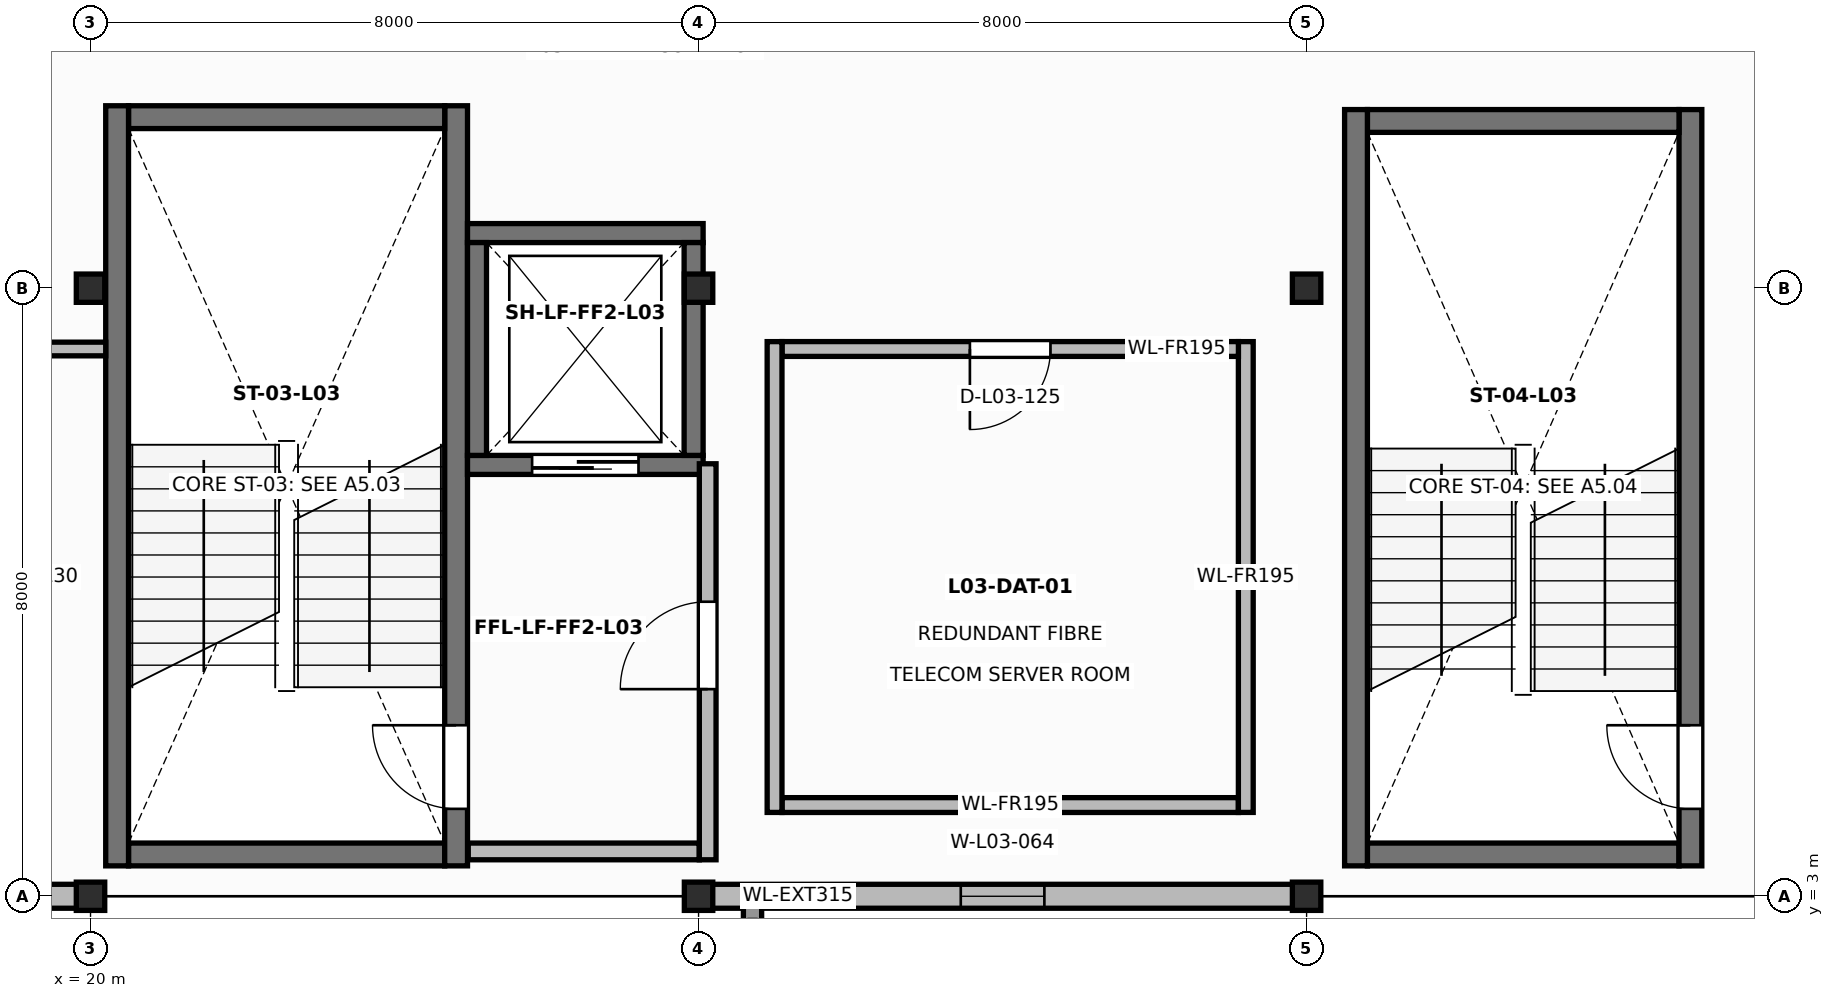
"""IFC4 building model, lengths in metres.
Left out: names, types, materials, properties, quantities, classifications, styles, units other than length and angle.
Written with IfcOpenShell. Run it as: python <this file> out.ifc"""

import sys

from ifc_helpers import new_model, si_unit, direction, frame, frame_2d, origin, origin_2d, place, context, subcontext, project, spatial, rectangle, i_section, extrude, element, fill, save


model = new_model("IFC4")
c1 = context("Model", 3, precision=1e-05, world=origin(), true_north=direction((0.0, 1.0)))
c2 = subcontext(c1, "Body", "Model", "MODEL_VIEW")
j1 = project(units=[si_unit("LENGTHUNIT", "METRE"), si_unit("PLANEANGLEUNIT", "RADIAN")], contexts=[c1])
p1 = place(None, origin())
s1 = spatial("IfcSite", under=j1, at=p1, CompositionType="ELEMENT")
p2 = place(p1, origin())
s2 = spatial("IfcBuilding", under=s1, at=p2, CompositionType="ELEMENT")
p3 = place(p2, frame((0.0, 0.0, 15.6)))
s3 = spatial("IfcBuildingStorey", under=s2, at=p3, CompositionType="ELEMENT", Elevation=15.6)
for number, where, z_axis, x_axis in (
    (1, (20.0, 3.0, 0.0), (0.0, 0.0, 1.0), (1.0, 0.0, 0.0)),
    (2, (20.0, 11.0, 0.0), (0.0, 0.0, 1.0), (1.0, 0.0, 0.0)),
    (3, (28.0, 3.0, 0.0), (0.0, 0.0, 1.0), (1.0, 0.0, 0.0)),
    (4, (28.0, 11.0, 0.0), (0.0, 0.0, 1.0), (1.0, 0.0, 0.0)),
    (5, (36.0, 3.0, 0.0), (0.0, 0.0, 1.0), (1.0, 0.0, 0.0)),
    (6, (36.0, 11.0, 0.0), (0.0, 0.0, 1.0), (1.0, 0.0, 0.0)),
):
    element("IfcColumn", number, at=place(p3, frame(where, z_axis=z_axis, x_axis=x_axis)), inside=s3, PredefinedType="COLUMN", context=c2, shape_type="SweptSolid", body=[
        extrude(i_section(OverallWidth=0.374, OverallDepth=0.372, WebThickness=0.016, FlangeThickness=0.026, at=origin_2d()), origin(), (0.0, 0.0, 1.0), 4.2),
    ])
p4 = place(p3, frame((20.5, 3.55, 0.0), z_axis=(0.0, 0.0, 1.0), x_axis=(1.0, 0.0, 0.0)))
e7 = element("IfcWall", 7, at=p4, inside=s3, PredefinedType="SHEAR", context=c2, shape_type="SweptSolid", body=[
    extrude(rectangle(XDim=4.16, YDim=0.3, at=frame_2d((2.08, 0.0))), origin(), (0.0, 0.0, 1.0), 3.975),
])
p5 = place(p3, frame((24.81, 3.4, 0.0), z_axis=(0.0, 0.0, 1.0), x_axis=(0.0, 1.0, 0.0)))
e8 = element("IfcWall", 8, at=p5, inside=s3, PredefinedType="SHEAR", context=c2, shape_type="SweptSolid", body=[
    extrude(rectangle(XDim=10.0, YDim=0.3, at=frame_2d((5.0, 0.0))), origin(), (0.0, 0.0, 1.0), 3.975),
])
p6 = place(p5, frame((0.75, 0.0, 0.0)))
e9 = element("IfcOpeningElement", 9, at=p6, cuts=e8, PredefinedType="OPENING", context=c2, shape_type="SweptSolid", body=[
    extrude(rectangle(XDim=1.1, YDim=2.15, at=frame_2d((0.55, 1.075))), frame((0.0, 0.16, 0.0), z_axis=(0.0, -1.0, 0.0), x_axis=(1.0, 0.0, 0.0)), (0.0, 0.0, 1.0), 0.32),
])
p7 = place(p3, frame((24.66, 13.25, 0.0), z_axis=(0.0, 0.0, 1.0), x_axis=(-1.0, 0.0, 0.0)))
e10 = element("IfcWall", 10, at=p7, inside=s3, PredefinedType="SHEAR", context=c2, shape_type="SweptSolid", body=[
    extrude(rectangle(XDim=4.16, YDim=0.3, at=frame_2d((2.08, 0.0))), origin(), (0.0, 0.0, 1.0), 3.975),
])
p8 = place(p3, frame((20.35, 13.4, 0.0), z_axis=(0.0, 0.0, 1.0), x_axis=(0.0, -1.0, 0.0)))
e11 = element("IfcWall", 11, at=p8, inside=s3, PredefinedType="SHEAR", context=c2, shape_type="SweptSolid", body=[
    extrude(rectangle(XDim=10.0, YDim=0.3, at=frame_2d((5.0, 0.0))), origin(), (0.0, 0.0, 1.0), 3.975),
])
p9 = place(p3, frame((36.8, 3.55, 0.0), z_axis=(0.0, 0.0, 1.0), x_axis=(1.0, 0.0, 0.0)))
e12 = element("IfcWall", 12, at=p9, inside=s3, PredefinedType="SHEAR", context=c2, shape_type="SweptSolid", body=[
    extrude(rectangle(XDim=4.1, YDim=0.3, at=frame_2d((2.05, 0.0))), origin(), (0.0, 0.0, 1.0), 3.975),
])
p10 = place(p3, frame((41.05, 3.4, 0.0), z_axis=(0.0, 0.0, 1.0), x_axis=(0.0, 1.0, 0.0)))
e13 = element("IfcWall", 13, at=p10, inside=s3, PredefinedType="SHEAR", context=c2, shape_type="SweptSolid", body=[
    extrude(rectangle(XDim=9.95, YDim=0.3, at=frame_2d((4.975, 0.0))), origin(), (0.0, 0.0, 1.0), 3.975),
])
p11 = place(p10, frame((0.75, 0.0, 0.0)))
e14 = element("IfcOpeningElement", 14, at=p11, cuts=e13, PredefinedType="OPENING", context=c2, shape_type="SweptSolid", body=[
    extrude(rectangle(XDim=1.1, YDim=2.15, at=frame_2d((0.55, 1.075))), frame((0.0, 0.16, 0.0), z_axis=(0.0, -1.0, 0.0), x_axis=(1.0, 0.0, 0.0)), (0.0, 0.0, 1.0), 0.32),
])
p12 = place(p3, frame((40.9, 13.2, 0.0), z_axis=(0.0, 0.0, 1.0), x_axis=(-1.0, 0.0, 0.0)))
e15 = element("IfcWall", 15, at=p12, inside=s3, PredefinedType="SHEAR", context=c2, shape_type="SweptSolid", body=[
    extrude(rectangle(XDim=4.1, YDim=0.3, at=frame_2d((2.05, 0.0))), origin(), (0.0, 0.0, 1.0), 3.975),
])
p13 = place(p3, frame((36.65, 13.35, 0.0), z_axis=(0.0, 0.0, 1.0), x_axis=(0.0, -1.0, 0.0)))
e16 = element("IfcWall", 16, at=p13, inside=s3, PredefinedType="SHEAR", context=c2, shape_type="SweptSolid", body=[
    extrude(rectangle(XDim=9.95, YDim=0.3, at=frame_2d((4.975, 0.0))), origin(), (0.0, 0.0, 1.0), 3.975),
])
p14 = place(p3, frame((24.96, 8.675, 0.0), z_axis=(0.0, 0.0, 1.0), x_axis=(1.0, 0.0, 0.0)))
e17 = element("IfcWall", 17, at=p14, inside=s3, PredefinedType="SOLIDWALL", context=c2, shape_type="SweptSolid", body=[
    extrude(rectangle(XDim=3.1, YDim=0.25, at=frame_2d((1.55, 0.0))), origin(), (0.0, 0.0, 1.0), 3.975),
])
p15 = place(p14, frame((0.85, 0.0, 0.0)))
e18 = element("IfcOpeningElement", 18, at=p15, cuts=e17, PredefinedType="OPENING", context=c2, shape_type="SweptSolid", body=[
    extrude(rectangle(XDim=1.4, YDim=2.25, at=frame_2d((0.7, 1.125))), frame((0.0, 0.135, 0.0), z_axis=(0.0, -1.0, 0.0), x_axis=(1.0, 0.0, 0.0)), (0.0, 0.0, 1.0), 0.27),
])
p16 = place(p3, frame((28.06, 11.725, 0.0), z_axis=(0.0, 0.0, 1.0), x_axis=(-1.0, 0.0, 0.0)))
e19 = element("IfcWall", 19, at=p16, inside=s3, PredefinedType="SOLIDWALL", context=c2, shape_type="SweptSolid", body=[
    extrude(rectangle(XDim=3.1, YDim=0.25, at=frame_2d((1.55, 0.0))), origin(), (0.0, 0.0, 1.0), 3.975),
])
for number, where, z_axis, x_axis in (
    (20, (27.935, 8.8, 0.0), (0.0, 0.0, 1.0), (0.0, 1.0, 0.0)),
    (21, (25.085, 11.6, 0.0), (0.0, 0.0, 1.0), (0.0, -1.0, 0.0)),
):
    element("IfcWall", number, at=place(p3, frame(where, z_axis=z_axis, x_axis=x_axis)), inside=s3, PredefinedType="SOLIDWALL", context=c2, shape_type="SweptSolid", body=[
        extrude(rectangle(XDim=2.8, YDim=0.25, at=frame_2d((1.4, 0.0))), origin(), (0.0, 0.0, 1.0), 3.975),
    ])
p17 = place(p3, frame((24.97, 3.59, 0.0), z_axis=(0.0, 0.0, 1.0), x_axis=(1.0, 0.0, 0.0)))
e22 = element("IfcWall", 22, at=p17, inside=s3, PredefinedType="SOLIDWALL", context=c2, shape_type="SweptSolid", body=[
    extrude(rectangle(XDim=3.04, YDim=0.22, at=frame_2d((1.52, 0.0))), origin(), (0.0, 0.0, 1.0), 3.975),
])
p18 = place(p3, frame((28.12, 3.48, 0.0), z_axis=(0.0, 0.0, 1.0), x_axis=(0.0, 1.0, 0.0)))
e23 = element("IfcWall", 23, at=p18, inside=s3, PredefinedType="SOLIDWALL", context=c2, shape_type="SweptSolid", body=[
    extrude(rectangle(XDim=5.21, YDim=0.22, at=frame_2d((2.605, 0.0))), origin(), (0.0, 0.0, 1.0), 3.358),
])
p19 = place(p18, frame((2.245, 0.0, 0.0)))
e24 = element("IfcOpeningElement", 24, at=p19, cuts=e23, PredefinedType="OPENING", context=c2, shape_type="SweptSolid", body=[
    extrude(rectangle(XDim=1.15, YDim=2.15, at=frame_2d((0.575, 1.075))), frame((0.0, 0.12, 0.0), z_axis=(0.0, -1.0, 0.0), x_axis=(1.0, 0.0, 0.0)), (0.0, 0.0, 1.0), 0.24),
])
p20 = place(p3, frame((12.01, 3.0, 0.0), z_axis=(0.0, 0.0, 1.0), x_axis=(1.0, 0.0, 0.0)))
e25 = element("IfcWall", 25, at=p20, inside=s3, PredefinedType="SOLIDWALL", context=c2, shape_type="SweptSolid", body=[
    extrude(rectangle(XDim=7.98, YDim=0.315, at=frame_2d((3.99, 0.0))), origin(), (0.0, 0.0, 1.0), 3.35),
])
p21 = place(p20, frame((3.315, 0.0, 0.85)))
e26 = element("IfcOpeningElement", 26, at=p21, cuts=e25, PredefinedType="OPENING", context=c2, shape_type="SweptSolid", body=[
    extrude(rectangle(XDim=1.35, YDim=1.95, at=frame_2d((0.675, 0.975))), frame((0.0, 0.167, 0.0), z_axis=(0.0, -1.0, 0.0), x_axis=(1.0, 0.0, 0.0)), (0.0, 0.0, 1.0), 0.335),
])
p22 = place(p3, frame((28.01, 3.0, 0.0), z_axis=(0.0, 0.0, 1.0), x_axis=(1.0, 0.0, 0.0)))
e27 = element("IfcWall", 27, at=p22, inside=s3, PredefinedType="SOLIDWALL", context=c2, shape_type="SweptSolid", body=[
    extrude(rectangle(XDim=7.98, YDim=0.315, at=frame_2d((3.99, 0.0))), origin(), (0.0, 0.0, 1.0), 3.35),
])
p23 = place(p22, frame((3.44, 0.0, 0.85)))
e28 = element("IfcOpeningElement", 28, at=p23, cuts=e27, PredefinedType="OPENING", context=c2, shape_type="SweptSolid", body=[
    extrude(rectangle(XDim=1.1, YDim=1.85, at=frame_2d((0.55, 0.925))), frame((0.0, 0.167, 0.0), z_axis=(0.0, -1.0, 0.0), x_axis=(1.0, 0.0, 0.0)), (0.0, 0.0, 1.0), 0.335),
])
p24 = place(p3, frame((19.29, 10.2, 0.0), z_axis=(0.0, 0.0, 1.0), x_axis=(1.0, 0.0, 0.0)))
e29 = element("IfcWall", 29, at=p24, inside=s3, PredefinedType="PARTITIONING", context=c2, shape_type="SweptSolid", body=[
    extrude(rectangle(XDim=0.91, YDim=0.18, at=frame_2d((0.455, 0.0))), origin(), (0.0, 0.0, 1.0), 3.358),
])
p25 = place(p3, frame((29.098, 4.2, 0.0), z_axis=(0.0, 0.0, 1.0), x_axis=(1.0, 0.0, 0.0)))
e30 = element("IfcWall", 30, at=p25, inside=s3, PredefinedType="PARTITIONING", context=c2, shape_type="SweptSolid", body=[
    extrude(rectangle(XDim=6.005, YDim=0.195, at=frame_2d((3.002, 0.0))), origin(), (0.0, 0.0, 1.0), 3.9),
])
p26 = place(p3, frame((35.2, 4.103, 0.0), z_axis=(0.0, 0.0, 1.0), x_axis=(0.0, 1.0, 0.0)))
e31 = element("IfcWall", 31, at=p26, inside=s3, PredefinedType="PARTITIONING", context=c2, shape_type="SweptSolid", body=[
    extrude(rectangle(XDim=6.194, YDim=0.195, at=frame_2d((3.097, 0.0))), origin(), (0.0, 0.0, 1.0), 3.621),
])
p27 = place(p3, frame((35.103, 10.2, 0.0), z_axis=(0.0, 0.0, 1.0), x_axis=(-1.0, 0.0, 0.0)))
e32 = element("IfcWall", 32, at=p27, inside=s3, PredefinedType="PARTITIONING", context=c2, shape_type="SweptSolid", body=[
    extrude(rectangle(XDim=6.005, YDim=0.195, at=frame_2d((3.002, 0.0))), origin(), (0.0, 0.0, 1.0), 3.9),
])
p28 = place(p27, frame((2.473, 0.0, 0.0)))
e33 = element("IfcOpeningElement", 33, at=p28, cuts=e32, PredefinedType="OPENING", context=c2, shape_type="SweptSolid", body=[
    extrude(rectangle(XDim=1.06, YDim=2.16, at=frame_2d((0.53, 1.08))), frame((0.0, 0.107, 0.0), z_axis=(0.0, -1.0, 0.0), x_axis=(1.0, 0.0, 0.0)), (0.0, 0.0, 1.0), 0.215),
])
p29 = place(p3, frame((29.0, 10.297, 0.0), z_axis=(0.0, 0.0, 1.0), x_axis=(0.0, -1.0, 0.0)))
e34 = element("IfcWall", 34, at=p29, inside=s3, PredefinedType="PARTITIONING", context=c2, shape_type="SweptSolid", body=[
    extrude(rectangle(XDim=6.194, YDim=0.195, at=frame_2d((3.097, 0.0))), origin(), (0.0, 0.0, 1.0), 3.621),
])
p30 = place(p6, origin())
e35 = element("IfcDoor", 35, at=p30, inside=s3, OperationType="SINGLE_SWING_RIGHT", PredefinedType="DOOR", context=c2, shape_type="SweptSolid", body=[
    extrude(rectangle(XDim=1.1, YDim=2.15, at=frame_2d((0.55, 1.075))), frame((0.0, 0.025, 0.0), z_axis=(0.0, -1.0, 0.0), x_axis=(1.0, 0.0, 0.0)), (0.0, 0.0, 1.0), 0.05),
])
fill(e9, e35)
p31 = place(p11, origin())
e36 = element("IfcDoor", 36, at=p31, inside=s3, OperationType="SINGLE_SWING_RIGHT", PredefinedType="DOOR", context=c2, shape_type="SweptSolid", body=[
    extrude(rectangle(XDim=1.1, YDim=2.15, at=frame_2d((0.55, 1.075))), frame((0.0, 0.025, 0.0), z_axis=(0.0, -1.0, 0.0), x_axis=(1.0, 0.0, 0.0)), (0.0, 0.0, 1.0), 0.05),
])
fill(e14, e36)
p32 = place(p15, frame((1.4, 0.0, 0.0), z_axis=(0.0, 0.0, 1.0), x_axis=(-1.0, 0.0, 0.0)))
e37 = element("IfcDoor", 37, at=p32, inside=s3, OperationType="DOUBLE_DOOR_SLIDING", PredefinedType="DOOR", context=c2, shape_type="SweptSolid", body=[
    extrude(rectangle(XDim=1.4, YDim=2.25, at=frame_2d((0.7, 1.125))), frame((0.0, 0.025, 0.0), z_axis=(0.0, -1.0, 0.0), x_axis=(1.0, 0.0, 0.0)), (0.0, 0.0, 1.0), 0.05),
])
fill(e18, e37)
p33 = place(p19, origin())
e38 = element("IfcDoor", 38, at=p33, inside=s3, OperationType="SINGLE_SWING_LEFT", PredefinedType="DOOR", context=c2, shape_type="SweptSolid", body=[
    extrude(rectangle(XDim=1.15, YDim=2.15, at=frame_2d((0.575, 1.075))), frame((0.0, 0.025, 0.0), z_axis=(0.0, -1.0, 0.0), x_axis=(1.0, 0.0, 0.0)), (0.0, 0.0, 1.0), 0.05),
])
fill(e24, e38)
p34 = place(p23, origin())
e39 = element("IfcWindow", 39, at=p34, inside=s3, PartitioningType="SINGLE_PANEL", PredefinedType="WINDOW", context=c2, shape_type="SweptSolid", body=[
    extrude(rectangle(XDim=1.1, YDim=1.85, at=frame_2d((0.55, 0.925))), frame((0.0, 0.03, 0.0), z_axis=(0.0, -1.0, 0.0), x_axis=(1.0, 0.0, 0.0)), (0.0, 0.0, 1.0), 0.06),
])
fill(e28, e39)
p35 = place(p28, origin())
e40 = element("IfcDoor", 40, at=p35, inside=s3, OperationType="SINGLE_SWING_RIGHT", PredefinedType="DOOR", context=c2, shape_type="SweptSolid", body=[
    extrude(rectangle(XDim=1.06, YDim=2.16, at=frame_2d((0.53, 1.08))), frame((0.0, 0.025, 0.0), z_axis=(0.0, -1.0, 0.0), x_axis=(1.0, 0.0, 0.0)), (0.0, 0.0, 1.0), 0.05),
])
fill(e33, e40)
save(model, sys.argv[1])
